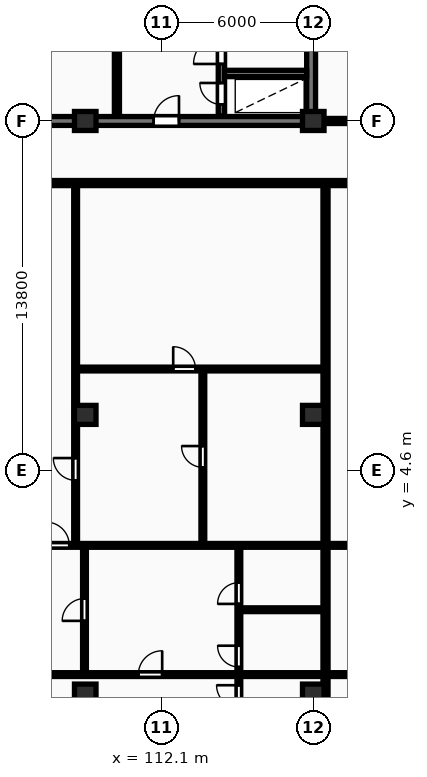
"""IFC4 building model, lengths in metres.
Left out: names, types, materials, properties, quantities, classifications, styles, units other than length and angle.
Written with IfcOpenShell. Run it as: python <this file> out.ifc"""

import sys

from ifc_helpers import new_model, si_unit, direction, frame, frame_2d, origin, origin_2d, place, context, subcontext, project, spatial, rectangle, extrude, element, fill, save


model = new_model("IFC4")
c1 = context("Model", 3, precision=1e-05, world=origin(), true_north=direction((0.0, 1.0)))
c2 = subcontext(c1, "Body", "Model", "MODEL_VIEW")
j1 = project(units=[si_unit("LENGTHUNIT", "METRE"), si_unit("PLANEANGLEUNIT", "RADIAN")], contexts=[c1])
p1 = place(None, origin())
s1 = spatial("IfcSite", under=j1, at=p1, CompositionType="ELEMENT")
p2 = place(p1, origin())
s2 = spatial("IfcBuilding", under=s1, at=p2, CompositionType="ELEMENT")
p3 = place(p2, frame((0.0, 0.0, 106.8)))
s3 = spatial("IfcBuildingStorey", under=s2, at=p3, CompositionType="ELEMENT", Elevation=106.8)
for number, where, z_axis, x_axis in (
    (1, (109.1, -4.2, 0.0), (0.0, 0.0, 1.0), (1.0, 0.0, 0.0)),
    (2, (109.1, 6.8, 0.0), (0.0, 0.0, 1.0), (1.0, 0.0, 0.0)),
    (3, (109.1, 18.4, 0.0), (0.0, 0.0, 1.0), (1.0, 0.0, 0.0)),
    (4, (118.1, -4.2, 0.0), (0.0, 0.0, 1.0), (1.0, 0.0, 0.0)),
    (5, (118.1, 6.8, 0.0), (0.0, 0.0, 1.0), (1.0, 0.0, 0.0)),
    (6, (118.1, 18.4, 0.0), (0.0, 0.0, 1.0), (1.0, 0.0, 0.0)),
):
    element("IfcColumn", number, at=place(p3, frame(where, z_axis=z_axis, x_axis=x_axis)), inside=s3, PredefinedType="COLUMN", context=c2, shape_type="SweptSolid", body=[
        extrude(rectangle(XDim=0.85, YDim=0.75, at=origin_2d()), origin(), (0.0, 0.0, 1.0), 3.25),
    ])
p4 = place(p3, frame((118.015, 18.575, 0.0), z_axis=(0.0, 0.0, 1.0), x_axis=(0.0, 1.0, 0.0)))
e7 = element("IfcWall", 7, at=p4, inside=s3, PredefinedType="SHEAR", context=c2, shape_type="SweptSolid", body=[
    extrude(rectangle(XDim=11.65, YDim=0.35, at=frame_2d((5.825, 0.0))), origin(), (0.0, 0.0, 1.0), 3.25),
])
p5 = place(p3, frame((81.925, 18.4, 0.0), z_axis=(0.0, 0.0, 1.0), x_axis=(1.0, 0.0, 0.0)))
e8 = element("IfcWall", 8, at=p5, inside=s3, PredefinedType="SHEAR", context=c2, shape_type="SweptSolid", body=[
    extrude(rectangle(XDim=36.265, YDim=0.35, at=frame_2d((18.132, 0.0))), origin(), (0.0, 0.0, 1.0), 3.25),
])
p6 = place(p5, frame((5.675, 0.0, 0.0)))
e9 = element("IfcOpeningElement", 9, at=p6, cuts=e8, PredefinedType="OPENING", context=c2, shape_type="SweptSolid", body=[
    extrude(rectangle(XDim=1.0, YDim=2.15, at=frame_2d((0.5, 1.075))), frame((0.0, 0.185, 0.0), z_axis=(0.0, -1.0, 0.0), x_axis=(1.0, 0.0, 0.0)), (0.0, 0.0, 1.0), 0.37),
])
p7 = place(p5, frame((21.925, 0.0, 0.0)))
e10 = element("IfcOpeningElement", 10, at=p7, cuts=e8, PredefinedType="OPENING", context=c2, shape_type="SweptSolid", body=[
    extrude(rectangle(XDim=1.5, YDim=2.2, at=frame_2d((0.75, 1.1))), frame((0.0, 0.185, 0.0), z_axis=(0.0, -1.0, 0.0), x_axis=(1.0, 0.0, 0.0)), (0.0, 0.0, 1.0), 0.37),
])
p8 = place(p5, frame((29.875, 0.0, 0.0)))
e11 = element("IfcOpeningElement", 11, at=p8, cuts=e8, PredefinedType="OPENING", context=c2, shape_type="SweptSolid", body=[
    extrude(rectangle(XDim=1.0, YDim=2.15, at=frame_2d((0.5, 1.075))), frame((0.0, 0.185, 0.0), z_axis=(0.0, -1.0, 0.0), x_axis=(1.0, 0.0, 0.0)), (0.0, 0.0, 1.0), 0.37),
])
p9 = place(p3, frame((110.35, 18.6, 0.0), z_axis=(0.0, 0.0, 1.0), x_axis=(0.0, 1.0, 0.0)))
e12 = element("IfcWall", 12, at=p9, inside=s3, PredefinedType="PARTITIONING", context=c2, shape_type="SweptSolid", body=[
    extrude(rectangle(XDim=11.6, YDim=0.2, at=frame_2d((5.8, 0.0))), origin(), (0.0, 0.0, 1.0), 2.97),
])
p10 = place(p9, frame((5.2, 0.0, 0.0)))
e13 = element("IfcOpeningElement", 13, at=p10, cuts=e12, PredefinedType="OPENING", context=c2, shape_type="SweptSolid", body=[
    extrude(rectangle(XDim=1.1, YDim=2.15, at=frame_2d((0.55, 1.075))), frame((0.0, 0.11, 0.0), z_axis=(0.0, -1.0, 0.0), x_axis=(1.0, 0.0, 0.0)), (0.0, 0.0, 1.0), 0.22),
])
p11 = place(p3, frame((114.475, 18.6, 0.0), z_axis=(0.0, 0.0, 1.0), x_axis=(0.0, 1.0, 0.0)))
e14 = element("IfcWall", 14, at=p11, inside=s3, PredefinedType="SHEAR", context=c2, shape_type="SweptSolid", body=[
    extrude(rectangle(XDim=11.6, YDim=0.25, at=frame_2d((5.8, 0.0))), origin(), (0.0, 0.0, 1.0), 3.25),
])
p12 = place(p11, frame((0.45, 0.0, 0.0)))
e15 = element("IfcOpeningElement", 15, at=p12, cuts=e14, PredefinedType="OPENING", context=c2, shape_type="SweptSolid", body=[
    extrude(rectangle(XDim=0.85, YDim=2.05, at=frame_2d((0.425, 1.025))), frame((0.0, 0.135, 0.0), z_axis=(0.0, -1.0, 0.0), x_axis=(1.0, 0.0, 0.0)), (0.0, 0.0, 1.0), 0.27),
])
p13 = place(p11, frame((2.05, 0.0, 0.0)))
e16 = element("IfcOpeningElement", 16, at=p13, cuts=e14, PredefinedType="OPENING", context=c2, shape_type="SweptSolid", body=[
    extrude(rectangle(XDim=1.1, YDim=2.1, at=frame_2d((0.55, 1.05))), frame((0.0, 0.135, 0.0), z_axis=(0.0, -1.0, 0.0), x_axis=(1.0, 0.0, 0.0)), (0.0, 0.0, 1.0), 0.27),
])
p14 = place(p11, frame((9.95, 0.0, 0.0)))
e17 = element("IfcOpeningElement", 17, at=p14, cuts=e14, PredefinedType="OPENING", context=c2, shape_type="SweptSolid", body=[
    extrude(rectangle(XDim=0.85, YDim=2.05, at=frame_2d((0.425, 1.025))), frame((0.0, 0.135, 0.0), z_axis=(0.0, -1.0, 0.0), x_axis=(1.0, 0.0, 0.0)), (0.0, 0.0, 1.0), 0.27),
])
p15 = place(p3, frame((114.6, 20.275, 0.0), z_axis=(0.0, 0.0, 1.0), x_axis=(1.0, 0.0, 0.0)))
e18 = element("IfcWall", 18, at=p15, inside=s3, PredefinedType="SHEAR", context=c2, shape_type="SweptSolid", body=[
    extrude(rectangle(XDim=3.24, YDim=0.25, at=frame_2d((1.62, 0.0))), origin(), (0.0, 0.0, 1.0), 3.25),
])
p16 = place(p3, frame((118.25, 18.4, 0.0), z_axis=(0.0, 0.0, 1.0), x_axis=(1.0, 0.0, 0.0)))
e19 = element("IfcWall", 19, at=p16, inside=s3, PredefinedType="PARTITIONING", context=c2, shape_type="SweptSolid", body=[
    extrude(rectangle(XDim=12.45, YDim=0.2, at=frame_2d((6.225, 0.0))), origin(), (0.0, 0.0, 1.0), 2.358),
])
p17 = place(p16, frame((1.51, 0.0, 0.0)))
e20 = element("IfcOpeningElement", 20, at=p17, cuts=e19, PredefinedType="OPENING", context=c2, shape_type="SweptSolid", body=[
    extrude(rectangle(XDim=0.95, YDim=2.15, at=frame_2d((0.475, 1.075))), frame((0.0, 0.11, 0.0), z_axis=(0.0, -1.0, 0.0), x_axis=(1.0, 0.0, 0.0)), (0.0, 0.0, 1.0), 0.22),
])
p18 = place(p3, frame((118.583, -8.7, 0.0), z_axis=(0.0, 0.0, 1.0), x_axis=(0.0, 1.0, 0.0)))
e21 = element("IfcWall", 21, at=p18, inside=s3, PredefinedType="PARTITIONING", context=c2, shape_type="SweptSolid", body=[
    extrude(rectangle(XDim=24.57, YDim=0.2, at=frame_2d((12.285, 0.0))), origin(), (0.0, 0.0, 1.0), 2.97),
])
p19 = place(p3, frame((113.742, 1.69, 0.0), z_axis=(0.0, 0.0, 1.0), x_axis=(0.0, 1.0, 0.0)))
e22 = element("IfcWall", 22, at=p19, inside=s3, PredefinedType="PARTITIONING", context=c2, shape_type="SweptSolid", body=[
    extrude(rectangle(XDim=6.92, YDim=0.15, at=frame_2d((3.46, 0.0))), origin(), (0.0, 0.0, 1.0), 2.97),
])
p20 = place(p19, frame((3.04, 0.0, 0.0)))
e23 = element("IfcOpeningElement", 23, at=p20, cuts=e22, PredefinedType="OPENING", context=c2, shape_type="SweptSolid", body=[
    extrude(rectangle(XDim=0.84, YDim=2.04, at=frame_2d((0.42, 1.02))), frame((0.0, 0.085, 0.0), z_axis=(0.0, -1.0, 0.0), x_axis=(1.0, 0.0, 0.0)), (0.0, 0.0, 1.0), 0.17),
])
p21 = place(p3, frame((108.78, 8.61, 0.0), z_axis=(0.0, 0.0, 1.0), x_axis=(1.0, 0.0, 0.0)))
e24 = element("IfcWall", 24, at=p21, inside=s3, PredefinedType="PARTITIONING", context=c2, shape_type="SweptSolid", body=[
    extrude(rectangle(XDim=9.723, YDim=0.15, at=frame_2d((4.862, 0.0))), origin(), (0.0, 0.0, 1.0), 2.97),
])
p22 = place(p21, frame((3.792, 0.0, 0.0)))
e25 = element("IfcOpeningElement", 25, at=p22, cuts=e24, PredefinedType="OPENING", context=c2, shape_type="SweptSolid", body=[
    extrude(rectangle(XDim=0.88, YDim=2.06, at=frame_2d((0.44, 1.03))), frame((0.0, 0.085, 0.0), z_axis=(0.0, -1.0, 0.0), x_axis=(1.0, 0.0, 0.0)), (0.0, 0.0, 1.0), 0.17),
])
p23 = place(p3, frame((108.72, 1.69, 0.0), z_axis=(0.0, 0.0, 1.0), x_axis=(0.0, 1.0, 0.0)))
e26 = element("IfcWall", 26, at=p23, inside=s3, PredefinedType="PARTITIONING", context=c2, shape_type="SweptSolid", body=[
    extrude(rectangle(XDim=14.2, YDim=0.15, at=frame_2d((7.1, 0.0))), origin(), (0.0, 0.0, 1.0), 2.97),
])
p24 = place(p23, frame((2.526, 0.0, 0.0)))
e27 = element("IfcOpeningElement", 27, at=p24, cuts=e26, PredefinedType="OPENING", context=c2, shape_type="SweptSolid", body=[
    extrude(rectangle(XDim=0.88, YDim=2.06, at=frame_2d((0.44, 1.03))), frame((0.0, 0.085, 0.0), z_axis=(0.0, -1.0, 0.0), x_axis=(1.0, 0.0, 0.0)), (0.0, 0.0, 1.0), 0.17),
])
p25 = place(p3, frame((109.07, -3.39, 0.0), z_axis=(0.0, 0.0, 1.0), x_axis=(0.0, 1.0, 0.0)))
e28 = element("IfcWall", 28, at=p25, inside=s3, PredefinedType="PARTITIONING", context=c2, shape_type="SweptSolid", body=[
    extrude(rectangle(XDim=5.0, YDim=0.15, at=frame_2d((2.5, 0.0))), origin(), (0.0, 0.0, 1.0), 2.2),
])
p26 = place(p25, frame((2.06, 0.0, 0.0)))
e29 = element("IfcOpeningElement", 29, at=p26, cuts=e28, PredefinedType="OPENING", context=c2, shape_type="SweptSolid", body=[
    extrude(rectangle(XDim=0.88, YDim=2.06, at=frame_2d((0.44, 1.03))), frame((0.0, 0.085, 0.0), z_axis=(0.0, -1.0, 0.0), x_axis=(1.0, 0.0, 0.0)), (0.0, 0.0, 1.0), 0.17),
])
p27 = place(p3, frame((115.223, -0.89, 0.0), z_axis=(0.0, 0.0, 1.0), x_axis=(1.0, 0.0, 0.0)))
e30 = element("IfcWall", 30, at=p27, inside=s3, PredefinedType="PARTITIONING", context=c2, shape_type="SweptSolid", body=[
    extrude(rectangle(XDim=3.28, YDim=0.15, at=frame_2d((1.64, 0.0))), origin(), (0.0, 0.0, 1.0), 2.97),
])
p28 = place(p3, frame((115.163, -8.7, 0.0), z_axis=(0.0, 0.0, 1.0), x_axis=(0.0, 1.0, 0.0)))
e31 = element("IfcWall", 31, at=p28, inside=s3, PredefinedType="PARTITIONING", context=c2, shape_type="SweptSolid", body=[
    extrude(rectangle(XDim=10.31, YDim=0.15, at=frame_2d((5.155, 0.0))), origin(), (0.0, 0.0, 1.0), 2.97),
])
p29 = place(p28, frame((5.55, 0.0, 0.0)))
e32 = element("IfcOpeningElement", 32, at=p29, cuts=e31, PredefinedType="OPENING", context=c2, shape_type="SweptSolid", body=[
    extrude(rectangle(XDim=0.84, YDim=2.04, at=frame_2d((0.42, 1.02))), frame((0.0, 0.085, 0.0), z_axis=(0.0, -1.0, 0.0), x_axis=(1.0, 0.0, 0.0)), (0.0, 0.0, 1.0), 0.17),
])
p30 = place(p28, frame((8.04, 0.0, 0.0)))
e33 = element("IfcOpeningElement", 33, at=p30, cuts=e31, PredefinedType="OPENING", context=c2, shape_type="SweptSolid", body=[
    extrude(rectangle(XDim=0.84, YDim=2.04, at=frame_2d((0.42, 1.02))), frame((0.0, 0.085, 0.0), z_axis=(0.0, -1.0, 0.0), x_axis=(1.0, 0.0, 0.0)), (0.0, 0.0, 1.0), 0.17),
])
p31 = place(p28, frame((3.95, 0.0, 0.0)))
e34 = element("IfcOpeningElement", 34, at=p31, cuts=e31, PredefinedType="OPENING", context=c2, shape_type="SweptSolid", body=[
    extrude(rectangle(XDim=0.88, YDim=2.06, at=frame_2d((0.44, 1.03))), frame((0.0, 0.085, 0.0), z_axis=(0.0, -1.0, 0.0), x_axis=(1.0, 0.0, 0.0)), (0.0, 0.0, 1.0), 0.17),
])
p32 = place(p3, frame((104.83, 1.65, 0.0), z_axis=(0.0, 0.0, 1.0), x_axis=(1.0, 0.0, 0.0)))
e35 = element("IfcWall", 35, at=p32, inside=s3, PredefinedType="PARTITIONING", context=c2, shape_type="SweptSolid", body=[
    extrude(rectangle(XDim=13.673, YDim=0.15, at=frame_2d((6.837, 0.0))), origin(), (0.0, 0.0, 1.0), 2.97),
])
p33 = place(p32, frame((2.72, 0.0, 0.0)))
e36 = element("IfcOpeningElement", 36, at=p33, cuts=e35, PredefinedType="OPENING", context=c2, shape_type="SweptSolid", body=[
    extrude(rectangle(XDim=0.92, YDim=2.08, at=frame_2d((0.46, 1.04))), frame((0.0, 0.085, 0.0), z_axis=(0.0, -1.0, 0.0), x_axis=(1.0, 0.0, 0.0)), (0.0, 0.0, 1.0), 0.17),
])
p34 = place(p3, frame((104.83, -3.45, 0.0), z_axis=(0.0, 0.0, 1.0), x_axis=(1.0, 0.0, 0.0)))
e37 = element("IfcWall", 37, at=p34, inside=s3, PredefinedType="PARTITIONING", context=c2, shape_type="SweptSolid", body=[
    extrude(rectangle(XDim=13.673, YDim=0.15, at=frame_2d((6.837, 0.0))), origin(), (0.0, 0.0, 1.0), 2.97),
])
p35 = place(p34, frame((6.367, 0.0, 0.0)))
e38 = element("IfcOpeningElement", 38, at=p35, cuts=e37, PredefinedType="OPENING", context=c2, shape_type="SweptSolid", body=[
    extrude(rectangle(XDim=0.94, YDim=2.1, at=frame_2d((0.47, 1.05))), frame((0.0, 0.085, 0.0), z_axis=(0.0, -1.0, 0.0), x_axis=(1.0, 0.0, 0.0)), (0.0, 0.0, 1.0), 0.17),
])
p36 = place(p3, frame((118.663, 1.65, 0.0), z_axis=(0.0, 0.0, 1.0), x_axis=(1.0, 0.0, 0.0)))
e39 = element("IfcWall", 39, at=p36, inside=s3, PredefinedType="PARTITIONING", context=c2, shape_type="SweptSolid", body=[
    extrude(rectangle(XDim=11.957, YDim=0.15, at=frame_2d((5.979, 0.0))), origin(), (0.0, 0.0, 1.0), 2.97),
])
p37 = place(p36, frame((2.72, 0.0, 0.0)))
e40 = element("IfcOpeningElement", 40, at=p37, cuts=e39, PredefinedType="OPENING", context=c2, shape_type="SweptSolid", body=[
    extrude(rectangle(XDim=0.92, YDim=2.08, at=frame_2d((0.46, 1.04))), frame((0.0, 0.085, 0.0), z_axis=(0.0, -1.0, 0.0), x_axis=(1.0, 0.0, 0.0)), (0.0, 0.0, 1.0), 0.17),
])
p38 = place(p3, frame((118.663, -3.45, 0.0), z_axis=(0.0, 0.0, 1.0), x_axis=(1.0, 0.0, 0.0)))
e41 = element("IfcWall", 41, at=p38, inside=s3, PredefinedType="PARTITIONING", context=c2, shape_type="SweptSolid", body=[
    extrude(rectangle(XDim=11.957, YDim=0.15, at=frame_2d((5.979, 0.0))), origin(), (0.0, 0.0, 1.0), 2.97),
])
p39 = place(p38, frame((6.613, 0.0, 0.0)))
e42 = element("IfcOpeningElement", 42, at=p39, cuts=e41, PredefinedType="OPENING", context=c2, shape_type="SweptSolid", body=[
    extrude(rectangle(XDim=0.94, YDim=2.1, at=frame_2d((0.47, 1.05))), frame((0.0, 0.085, 0.0), z_axis=(0.0, -1.0, 0.0), x_axis=(1.0, 0.0, 0.0)), (0.0, 0.0, 1.0), 0.17),
])
p40 = place(p3, frame((72.7, 15.95, 0.0), z_axis=(0.0, 0.0, 1.0), x_axis=(1.0, 0.0, 0.0)))
e43 = element("IfcWall", 43, at=p40, inside=s3, PredefinedType="PARTITIONING", context=c2, shape_type="SweptSolid", body=[
    extrude(rectangle(XDim=58.0, YDim=0.2, at=frame_2d((29.0, 0.0))), origin(), (0.0, 0.0, 1.0), 2.97),
])
p41 = place(p40, frame((6.373, 0.0, 0.0)))
e44 = element("IfcOpeningElement", 44, at=p41, cuts=e43, PredefinedType="OPENING", context=c2, shape_type="SweptSolid", body=[
    extrude(rectangle(XDim=1.22, YDim=2.18, at=frame_2d((0.61, 1.09))), frame((0.0, 0.11, 0.0), z_axis=(0.0, -1.0, 0.0), x_axis=(1.0, 0.0, 0.0)), (0.0, 0.0, 1.0), 0.22),
])
p42 = place(p40, frame((21.678, 0.0, 0.0)))
e45 = element("IfcOpeningElement", 45, at=p42, cuts=e43, PredefinedType="OPENING", context=c2, shape_type="SweptSolid", body=[
    extrude(rectangle(XDim=0.95, YDim=2.15, at=frame_2d((0.475, 1.075))), frame((0.0, 0.11, 0.0), z_axis=(0.0, -1.0, 0.0), x_axis=(1.0, 0.0, 0.0)), (0.0, 0.0, 1.0), 0.22),
])
p43 = place(p40, frame((33.812, 0.0, 0.0)))
e46 = element("IfcOpeningElement", 46, at=p43, cuts=e43, PredefinedType="OPENING", context=c2, shape_type="SweptSolid", body=[
    extrude(rectangle(XDim=0.95, YDim=2.15, at=frame_2d((0.475, 1.075))), frame((0.0, 0.11, 0.0), z_axis=(0.0, -1.0, 0.0), x_axis=(1.0, 0.0, 0.0)), (0.0, 0.0, 1.0), 0.22),
])
p44 = place(p40, frame((47.928, 0.0, 0.0)))
e47 = element("IfcOpeningElement", 47, at=p44, cuts=e43, PredefinedType="OPENING", context=c2, shape_type="SweptSolid", body=[
    extrude(rectangle(XDim=0.95, YDim=2.15, at=frame_2d((0.475, 1.075))), frame((0.0, 0.11, 0.0), z_axis=(0.0, -1.0, 0.0), x_axis=(1.0, 0.0, 0.0)), (0.0, 0.0, 1.0), 0.22),
])
p45 = place(p8, origin())
e48 = element("IfcDoor", 48, at=p45, inside=s3, OperationType="SINGLE_SWING_RIGHT", PredefinedType="DOOR", context=c2, shape_type="SweptSolid", body=[
    extrude(rectangle(XDim=1.0, YDim=2.15, at=frame_2d((0.5, 1.075))), frame((0.0, 0.025, 0.0), z_axis=(0.0, -1.0, 0.0), x_axis=(1.0, 0.0, 0.0)), (0.0, 0.0, 1.0), 0.05),
])
fill(e11, e48)
p46 = place(p12, origin())
e49 = element("IfcDoor", 49, at=p46, inside=s3, OperationType="SINGLE_SWING_RIGHT", PredefinedType="DOOR", context=c2, shape_type="SweptSolid", body=[
    extrude(rectangle(XDim=0.85, YDim=2.05, at=frame_2d((0.425, 1.025))), frame((0.0, 0.025, 0.0), z_axis=(0.0, -1.0, 0.0), x_axis=(1.0, 0.0, 0.0)), (0.0, 0.0, 1.0), 0.05),
])
fill(e15, e49)
p47 = place(p13, origin())
e50 = element("IfcDoor", 50, at=p47, inside=s3, OperationType="SINGLE_SWING_LEFT", PredefinedType="DOOR", context=c2, shape_type="SweptSolid", body=[
    extrude(rectangle(XDim=1.1, YDim=2.1, at=frame_2d((0.55, 1.05))), frame((0.0, 0.025, 0.0), z_axis=(0.0, -1.0, 0.0), x_axis=(1.0, 0.0, 0.0)), (0.0, 0.0, 1.0), 0.05),
])
fill(e16, e50)
p48 = place(p20, origin())
e51 = element("IfcDoor", 51, at=p48, inside=s3, OperationType="SINGLE_SWING_RIGHT", PredefinedType="DOOR", context=c2, shape_type="SweptSolid", body=[
    extrude(rectangle(XDim=0.84, YDim=2.04, at=frame_2d((0.42, 1.02))), frame((0.0, 0.025, 0.0), z_axis=(0.0, -1.0, 0.0), x_axis=(1.0, 0.0, 0.0)), (0.0, 0.0, 1.0), 0.05),
])
fill(e23, e51)
p49 = place(p22, origin())
e52 = element("IfcDoor", 52, at=p49, inside=s3, OperationType="SINGLE_SWING_LEFT", PredefinedType="DOOR", context=c2, shape_type="SweptSolid", body=[
    extrude(rectangle(XDim=0.88, YDim=2.06, at=frame_2d((0.44, 1.03))), frame((0.0, 0.025, 0.0), z_axis=(0.0, -1.0, 0.0), x_axis=(1.0, 0.0, 0.0)), (0.0, 0.0, 1.0), 0.05),
])
fill(e25, e52)
p50 = place(p24, origin())
e53 = element("IfcDoor", 53, at=p50, inside=s3, OperationType="SINGLE_SWING_RIGHT", PredefinedType="DOOR", context=c2, shape_type="SweptSolid", body=[
    extrude(rectangle(XDim=0.88, YDim=2.06, at=frame_2d((0.44, 1.03))), frame((0.0, 0.025, 0.0), z_axis=(0.0, -1.0, 0.0), x_axis=(1.0, 0.0, 0.0)), (0.0, 0.0, 1.0), 0.05),
])
fill(e27, e53)
p51 = place(p26, origin())
e54 = element("IfcDoor", 54, at=p51, inside=s3, OperationType="SINGLE_SWING_LEFT", PredefinedType="DOOR", context=c2, shape_type="SweptSolid", body=[
    extrude(rectangle(XDim=0.88, YDim=2.06, at=frame_2d((0.44, 1.03))), frame((0.0, 0.025, 0.0), z_axis=(0.0, -1.0, 0.0), x_axis=(1.0, 0.0, 0.0)), (0.0, 0.0, 1.0), 0.05),
])
fill(e29, e54)
p52 = place(p29, origin())
e55 = element("IfcDoor", 55, at=p52, inside=s3, OperationType="SINGLE_SWING_RIGHT", PredefinedType="DOOR", context=c2, shape_type="SweptSolid", body=[
    extrude(rectangle(XDim=0.84, YDim=2.04, at=frame_2d((0.42, 1.02))), frame((0.0, 0.025, 0.0), z_axis=(0.0, -1.0, 0.0), x_axis=(1.0, 0.0, 0.0)), (0.0, 0.0, 1.0), 0.05),
])
fill(e32, e55)
p53 = place(p30, origin())
e56 = element("IfcDoor", 56, at=p53, inside=s3, OperationType="SINGLE_SWING_LEFT", PredefinedType="DOOR", context=c2, shape_type="SweptSolid", body=[
    extrude(rectangle(XDim=0.84, YDim=2.04, at=frame_2d((0.42, 1.02))), frame((0.0, 0.025, 0.0), z_axis=(0.0, -1.0, 0.0), x_axis=(1.0, 0.0, 0.0)), (0.0, 0.0, 1.0), 0.05),
])
fill(e33, e56)
p54 = place(p31, origin())
e57 = element("IfcDoor", 57, at=p54, inside=s3, OperationType="SINGLE_SWING_RIGHT", PredefinedType="DOOR", context=c2, shape_type="SweptSolid", body=[
    extrude(rectangle(XDim=0.88, YDim=2.06, at=frame_2d((0.44, 1.03))), frame((0.0, 0.025, 0.0), z_axis=(0.0, -1.0, 0.0), x_axis=(1.0, 0.0, 0.0)), (0.0, 0.0, 1.0), 0.05),
])
fill(e34, e57)
p55 = place(p33, origin())
e58 = element("IfcDoor", 58, at=p55, inside=s3, OperationType="SINGLE_SWING_LEFT", PredefinedType="DOOR", context=c2, shape_type="SweptSolid", body=[
    extrude(rectangle(XDim=0.92, YDim=2.08, at=frame_2d((0.46, 1.04))), frame((0.0, 0.025, 0.0), z_axis=(0.0, -1.0, 0.0), x_axis=(1.0, 0.0, 0.0)), (0.0, 0.0, 1.0), 0.05),
])
fill(e36, e58)
p56 = place(p35, origin())
e59 = element("IfcDoor", 59, at=p56, inside=s3, OperationType="SINGLE_SWING_RIGHT", PredefinedType="DOOR", context=c2, shape_type="SweptSolid", body=[
    extrude(rectangle(XDim=0.94, YDim=2.1, at=frame_2d((0.47, 1.05))), frame((0.0, 0.025, 0.0), z_axis=(0.0, -1.0, 0.0), x_axis=(1.0, 0.0, 0.0)), (0.0, 0.0, 1.0), 0.05),
])
fill(e38, e59)
save(model, sys.argv[1])
